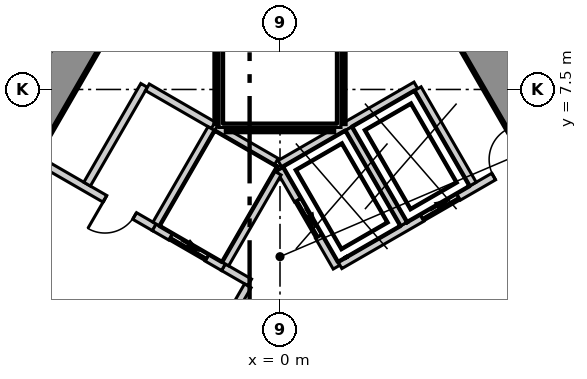
"""IFC4 building model, lengths in metres.
Left out: names, types, materials, properties, quantities, classifications, styles, units other than length and angle.
Written with IfcOpenShell. Run it as: python <this file> out.ifc"""

import sys

from ifc_helpers import new_model, si_unit, direction, frame, frame_2d, origin, place, context, subcontext, project, spatial, polyline, rectangle, outline, extrude, element, fill, save


model = new_model("IFC4")
c1 = context("Model", 3, precision=1e-05, world=origin(), true_north=direction((0.0, 1.0)))
c2 = subcontext(c1, "Body", "Model", "MODEL_VIEW")
j1 = project(units=[si_unit("LENGTHUNIT", "METRE"), si_unit("PLANEANGLEUNIT", "RADIAN")], contexts=[c1])
p1 = place(None, origin())
s1 = spatial("IfcSite", under=j1, at=p1, CompositionType="ELEMENT")
p2 = place(p1, origin())
s2 = spatial("IfcBuilding", under=s1, at=p2, CompositionType="ELEMENT")
p3 = place(p2, frame((0.0, 0.0, 95.3)))
s3 = spatial("IfcBuildingStorey", under=s2, at=p3, CompositionType="ELEMENT", Elevation=95.3)
p4 = place(p3, frame((-1.66, 15.025, -0.3), z_axis=(0.0, 0.0, 1.0), x_axis=(-0.500003780125, -0.866023221317, 0.0)))
e1 = element("IfcWall", 1, at=p4, inside=s3, PredefinedType="SHEAR", context=c2, shape_type="SweptSolid", body=[
    extrude(outline(polyline([(-0.462, -0.55), (1.483, -0.55), (3.428, -0.55), (5.374, -0.55), (7.319, -0.55), (9.264, -0.55), (11.209, -0.55), (13.155, -0.55), (15.1, -0.55), (17.045, -0.55), (18.99, -0.55), (20.936, -0.55), (22.881, -0.55), (24.826, -0.55), (23.902, 0.55), (21.949, 0.55), (19.995, 0.55), (18.042, 0.55), (16.089, 0.55), (14.135, 0.55), (12.182, 0.55), (10.229, 0.55), (8.275, 0.55), (6.322, 0.55), (4.369, 0.55), (2.415, 0.55), (0.462, 0.55), (-0.462, -0.55)])), origin(), (0.0, 0.0, 1.0), 4.2),
])
p5 = place(p4, frame((11.776, 0.0, 0.3)))
e2 = element("IfcOpeningElement", 2, at=p5, cuts=e1, PredefinedType="OPENING", context=c2, shape_type="SweptSolid", body=[
    extrude(rectangle(XDim=1.1, YDim=2.1, at=frame_2d((0.55, 1.05))), frame((0.0, 0.56, 0.0), z_axis=(0.0, -1.0, 0.0), x_axis=(1.0, 0.0, 0.0)), (0.0, 0.0, 1.0), 1.12),
])
p6 = place(p3, frame((13.842, -6.075, -0.3), z_axis=(0.0, 0.0, 1.0), x_axis=(-0.500003780125, 0.866023221317, 0.0)))
e3 = element("IfcWall", 3, at=p6, inside=s3, PredefinedType="SHEAR", context=c2, shape_type="SweptSolid", body=[
    extrude(outline(polyline([(-0.462, -0.55), (1.483, -0.55), (3.428, -0.55), (5.374, -0.55), (7.319, -0.55), (9.264, -0.55), (11.209, -0.55), (13.155, -0.55), (15.1, -0.55), (17.045, -0.55), (18.99, -0.55), (20.936, -0.55), (22.881, -0.55), (24.826, -0.55), (23.902, 0.55), (21.949, 0.55), (19.995, 0.55), (18.042, 0.55), (16.089, 0.55), (14.135, 0.55), (12.182, 0.55), (10.229, 0.55), (8.275, 0.55), (6.322, 0.55), (4.369, 0.55), (2.415, 0.55), (0.462, 0.55), (-0.462, -0.55)])), origin(), (0.0, 0.0, 1.0), 4.2),
])
p7 = place(p6, frame((11.426, 0.0, 0.3)))
e4 = element("IfcOpeningElement", 4, at=p7, cuts=e3, PredefinedType="OPENING", context=c2, shape_type="SweptSolid", body=[
    extrude(rectangle(XDim=1.8, YDim=2.1, at=frame_2d((0.9, 1.05))), frame((0.0, 0.56, 0.0), z_axis=(0.0, -1.0, 0.0), x_axis=(1.0, 0.0, 0.0)), (0.0, 0.0, 1.0), 1.12),
])
p8 = place(p3, frame((-3.234, 36.072, 0.0), z_axis=(0.0, 0.0, 1.0), x_axis=(-0.500009108245, -0.866020145073, 0.0)))
e5 = element("IfcWall", 5, at=p8, inside=s3, PredefinedType="ELEMENTEDWALL", context=c2, shape_type="SweptSolid", body=[
    extrude(rectangle(XDim=59.225, YDim=0.2, at=frame_2d((29.613, 0.0))), origin(), (0.0, 0.0, 1.0), 3.9),
])
p9 = place(p8, frame((2.042, 0.0, 0.9)))
e6 = element("IfcOpeningElement", 6, at=p9, cuts=e5, PredefinedType="OPENING", context=c2, shape_type="SweptSolid", body=[
    extrude(rectangle(XDim=5.6, YDim=2.5, at=frame_2d((2.8, 1.25))), frame((0.0, 0.11, 0.0), z_axis=(0.0, -1.0, 0.0), x_axis=(1.0, 0.0, 0.0)), (0.0, 0.0, 1.0), 0.22),
])
p10 = place(p8, frame((9.122, 0.0, 0.9)))
e7 = element("IfcOpeningElement", 7, at=p10, cuts=e5, PredefinedType="OPENING", context=c2, shape_type="SweptSolid", body=[
    extrude(rectangle(XDim=5.6, YDim=2.5, at=frame_2d((2.8, 1.25))), frame((0.0, 0.11, 0.0), z_axis=(0.0, -1.0, 0.0), x_axis=(1.0, 0.0, 0.0)), (0.0, 0.0, 1.0), 0.22),
])
p11 = place(p8, frame((16.202, 0.0, 0.9)))
e8 = element("IfcOpeningElement", 8, at=p11, cuts=e5, PredefinedType="OPENING", context=c2, shape_type="SweptSolid", body=[
    extrude(rectangle(XDim=5.6, YDim=2.5, at=frame_2d((2.8, 1.25))), frame((0.0, 0.11, 0.0), z_axis=(0.0, -1.0, 0.0), x_axis=(1.0, 0.0, 0.0)), (0.0, 0.0, 1.0), 0.22),
])
p12 = place(p8, frame((23.282, 0.0, 0.9)))
e9 = element("IfcOpeningElement", 9, at=p12, cuts=e5, PredefinedType="OPENING", context=c2, shape_type="SweptSolid", body=[
    extrude(rectangle(XDim=5.6, YDim=2.5, at=frame_2d((2.8, 1.25))), frame((0.0, 0.11, 0.0), z_axis=(0.0, -1.0, 0.0), x_axis=(1.0, 0.0, 0.0)), (0.0, 0.0, 1.0), 0.22),
])
p13 = place(p8, frame((30.362, 0.0, 0.9)))
e10 = element("IfcOpeningElement", 10, at=p13, cuts=e5, PredefinedType="OPENING", context=c2, shape_type="SweptSolid", body=[
    extrude(rectangle(XDim=5.6, YDim=2.5, at=frame_2d((2.8, 1.25))), frame((0.0, 0.11, 0.0), z_axis=(0.0, -1.0, 0.0), x_axis=(1.0, 0.0, 0.0)), (0.0, 0.0, 1.0), 0.22),
])
p14 = place(p8, frame((37.442, 0.0, 0.9)))
e11 = element("IfcOpeningElement", 11, at=p14, cuts=e5, PredefinedType="OPENING", context=c2, shape_type="SweptSolid", body=[
    extrude(rectangle(XDim=5.6, YDim=2.5, at=frame_2d((2.8, 1.25))), frame((0.0, 0.11, 0.0), z_axis=(0.0, -1.0, 0.0), x_axis=(1.0, 0.0, 0.0)), (0.0, 0.0, 1.0), 0.22),
])
p15 = place(p8, frame((44.522, 0.0, 0.9)))
e12 = element("IfcOpeningElement", 12, at=p15, cuts=e5, PredefinedType="OPENING", context=c2, shape_type="SweptSolid", body=[
    extrude(rectangle(XDim=5.6, YDim=2.5, at=frame_2d((2.8, 1.25))), frame((0.0, 0.11, 0.0), z_axis=(0.0, -1.0, 0.0), x_axis=(1.0, 0.0, 0.0)), (0.0, 0.0, 1.0), 0.22),
])
p16 = place(p8, frame((51.602, 0.0, 0.9)))
e13 = element("IfcOpeningElement", 13, at=p16, cuts=e5, PredefinedType="OPENING", context=c2, shape_type="SweptSolid", body=[
    extrude(rectangle(XDim=5.6, YDim=2.5, at=frame_2d((2.8, 1.25))), frame((0.0, 0.11, 0.0), z_axis=(0.0, -1.0, 0.0), x_axis=(1.0, 0.0, 0.0)), (0.0, 0.0, 1.0), 0.22),
])
p17 = place(p3, frame((32.857, -15.235, 0.0), z_axis=(0.0, 0.0, 1.0), x_axis=(-0.500009108245, 0.866020145073, 0.0)))
e14 = element("IfcWall", 14, at=p17, inside=s3, PredefinedType="ELEMENTEDWALL", context=c2, shape_type="SweptSolid", body=[
    extrude(rectangle(XDim=59.225, YDim=0.2, at=frame_2d((29.613, 0.0))), origin(), (0.0, 0.0, 1.0), 3.9),
])
p18 = place(p17, frame((2.043, 0.0, 0.9)))
e15 = element("IfcOpeningElement", 15, at=p18, cuts=e14, PredefinedType="OPENING", context=c2, shape_type="SweptSolid", body=[
    extrude(rectangle(XDim=5.6, YDim=2.5, at=frame_2d((2.8, 1.25))), frame((0.0, 0.11, 0.0), z_axis=(0.0, -1.0, 0.0), x_axis=(1.0, 0.0, 0.0)), (0.0, 0.0, 1.0), 0.22),
])
p19 = place(p17, frame((9.123, 0.0, 0.9)))
e16 = element("IfcOpeningElement", 16, at=p19, cuts=e14, PredefinedType="OPENING", context=c2, shape_type="SweptSolid", body=[
    extrude(rectangle(XDim=5.6, YDim=2.5, at=frame_2d((2.8, 1.25))), frame((0.0, 0.11, 0.0), z_axis=(0.0, -1.0, 0.0), x_axis=(1.0, 0.0, 0.0)), (0.0, 0.0, 1.0), 0.22),
])
p20 = place(p17, frame((16.203, 0.0, 0.9)))
e17 = element("IfcOpeningElement", 17, at=p20, cuts=e14, PredefinedType="OPENING", context=c2, shape_type="SweptSolid", body=[
    extrude(rectangle(XDim=5.6, YDim=2.5, at=frame_2d((2.8, 1.25))), frame((0.0, 0.11, 0.0), z_axis=(0.0, -1.0, 0.0), x_axis=(1.0, 0.0, 0.0)), (0.0, 0.0, 1.0), 0.22),
])
p21 = place(p17, frame((23.282, 0.0, 0.9)))
e18 = element("IfcOpeningElement", 18, at=p21, cuts=e14, PredefinedType="OPENING", context=c2, shape_type="SweptSolid", body=[
    extrude(rectangle(XDim=5.6, YDim=2.5, at=frame_2d((2.8, 1.25))), frame((0.0, 0.11, 0.0), z_axis=(0.0, -1.0, 0.0), x_axis=(1.0, 0.0, 0.0)), (0.0, 0.0, 1.0), 0.22),
])
p22 = place(p17, frame((30.362, 0.0, 0.9)))
e19 = element("IfcOpeningElement", 19, at=p22, cuts=e14, PredefinedType="OPENING", context=c2, shape_type="SweptSolid", body=[
    extrude(rectangle(XDim=5.6, YDim=2.5, at=frame_2d((2.8, 1.25))), frame((0.0, 0.11, 0.0), z_axis=(0.0, -1.0, 0.0), x_axis=(1.0, 0.0, 0.0)), (0.0, 0.0, 1.0), 0.22),
])
p23 = place(p17, frame((37.442, 0.0, 0.9)))
e20 = element("IfcOpeningElement", 20, at=p23, cuts=e14, PredefinedType="OPENING", context=c2, shape_type="SweptSolid", body=[
    extrude(rectangle(XDim=5.6, YDim=2.5, at=frame_2d((2.8, 1.25))), frame((0.0, 0.11, 0.0), z_axis=(0.0, -1.0, 0.0), x_axis=(1.0, 0.0, 0.0)), (0.0, 0.0, 1.0), 0.22),
])
p24 = place(p17, frame((44.522, 0.0, 0.9)))
e21 = element("IfcOpeningElement", 21, at=p24, cuts=e14, PredefinedType="OPENING", context=c2, shape_type="SweptSolid", body=[
    extrude(rectangle(XDim=5.6, YDim=2.5, at=frame_2d((2.8, 1.25))), frame((0.0, 0.11, 0.0), z_axis=(0.0, -1.0, 0.0), x_axis=(1.0, 0.0, 0.0)), (0.0, 0.0, 1.0), 0.22),
])
p25 = place(p17, frame((51.602, 0.0, 0.9)))
e22 = element("IfcOpeningElement", 22, at=p25, cuts=e14, PredefinedType="OPENING", context=c2, shape_type="SweptSolid", body=[
    extrude(rectangle(XDim=5.6, YDim=2.5, at=frame_2d((2.8, 1.25))), frame((0.0, 0.11, 0.0), z_axis=(0.0, -1.0, 0.0), x_axis=(1.0, 0.0, 0.0)), (0.0, 0.0, 1.0), 0.22),
])
p26 = place(p3, frame((-16.685, -6.2, 0.0), z_axis=(0.0, 0.0, 1.0), x_axis=(0.500002442456, 0.866023993627, 0.0)))
e23 = element("IfcWall", 23, at=p26, inside=s3, PredefinedType="PARTITIONING", context=c2, shape_type="SweptSolid", body=[
    extrude(rectangle(XDim=27.424, YDim=0.15, at=frame_2d((13.712, 0.0))), origin(), (0.0, 0.0, 1.0), 3.9),
])
p27 = place(p26, frame((23.508, 0.0, 0.0)))
e24 = element("IfcOpeningElement", 24, at=p27, cuts=e23, PredefinedType="OPENING", context=c2, shape_type="SweptSolid", body=[
    extrude(rectangle(XDim=1.2, YDim=2.1, at=frame_2d((0.6, 1.05))), frame((0.0, 0.085, 0.0), z_axis=(0.0, -1.0, 0.0), x_axis=(1.0, 0.0, 0.0)), (0.0, 0.0, 1.0), 0.17),
])
p28 = place(p26, frame((13.112, 0.0, 0.0)))
e25 = element("IfcOpeningElement", 25, at=p28, cuts=e23, PredefinedType="OPENING", context=c2, shape_type="SweptSolid", body=[
    extrude(rectangle(XDim=1.2, YDim=2.1, at=frame_2d((0.6, 1.05))), frame((0.0, 0.085, 0.0), z_axis=(0.0, -1.0, 0.0), x_axis=(1.0, 0.0, 0.0)), (0.0, 0.0, 1.0), 0.17),
])
p29 = place(p26, frame((2.716, 0.0, 0.0)))
e26 = element("IfcOpeningElement", 26, at=p29, cuts=e23, PredefinedType="OPENING", context=c2, shape_type="SweptSolid", body=[
    extrude(rectangle(XDim=1.2, YDim=2.1, at=frame_2d((0.6, 1.05))), frame((0.0, 0.085, 0.0), z_axis=(0.0, -1.0, 0.0), x_axis=(1.0, 0.0, 0.0)), (0.0, 0.0, 1.0), 0.17),
])
p30 = place(p3, frame((3.017, 17.475, 0.0), z_axis=(0.0, 0.0, 1.0), x_axis=(0.499977309191, -0.866038503933, 0.0)))
e27 = element("IfcWall", 27, at=p30, inside=s3, PredefinedType="PARTITIONING", context=c2, shape_type="SweptSolid", body=[
    extrude(rectangle(XDim=27.337, YDim=0.15, at=frame_2d((13.668, 0.0))), origin(), (0.0, 0.0, 1.0), 3.9),
])
p31 = place(p30, frame((23.421, 0.0, 0.0)))
e28 = element("IfcOpeningElement", 28, at=p31, cuts=e27, PredefinedType="OPENING", context=c2, shape_type="SweptSolid", body=[
    extrude(rectangle(XDim=1.2, YDim=2.1, at=frame_2d((0.6, 1.05))), frame((0.0, 0.085, 0.0), z_axis=(0.0, -1.0, 0.0), x_axis=(1.0, 0.0, 0.0)), (0.0, 0.0, 1.0), 0.17),
])
p32 = place(p30, frame((13.025, 0.0, 0.0)))
e29 = element("IfcOpeningElement", 29, at=p32, cuts=e27, PredefinedType="OPENING", context=c2, shape_type="SweptSolid", body=[
    extrude(rectangle(XDim=1.2, YDim=2.1, at=frame_2d((0.6, 1.05))), frame((0.0, 0.085, 0.0), z_axis=(0.0, -1.0, 0.0), x_axis=(1.0, 0.0, 0.0)), (0.0, 0.0, 1.0), 0.17),
])
p33 = place(p30, frame((2.629, 0.0, 0.0)))
e30 = element("IfcOpeningElement", 30, at=p33, cuts=e27, PredefinedType="OPENING", context=c2, shape_type="SweptSolid", body=[
    extrude(rectangle(XDim=1.2, YDim=2.1, at=frame_2d((0.6, 1.05))), frame((0.0, 0.085, 0.0), z_axis=(0.0, -1.0, 0.0), x_axis=(1.0, 0.0, 0.0)), (0.0, 0.0, 1.0), 0.17),
])
p34 = place(p3, frame((-0.002, 5.541, 0.0), z_axis=(0.0, 0.0, 1.0), x_axis=(0.86600155993, 0.500041296494, 0.0)))
e31 = element("IfcWall", 31, at=p34, inside=s3, PredefinedType="SOLIDWALL", context=c2, shape_type="SweptSolid", body=[
    extrude(rectangle(XDim=4.132, YDim=0.2, at=frame_2d((2.066, 0.0))), origin(), (0.0, 0.0, 1.0), 3.9),
])
p35 = place(p3, frame((0.0, 5.4, 0.0), z_axis=(0.0, 0.0, 1.0), x_axis=(0.500103862429, -0.865965430478, 0.0)))
e32 = element("IfcWall", 32, at=p35, inside=s3, PredefinedType="SOLIDWALL", context=c2, shape_type="SweptSolid", body=[
    extrude(rectangle(XDim=2.973, YDim=0.2, at=frame_2d((1.487, 0.0))), origin(), (0.0, 0.0, 1.0), 3.9),
])
p36 = place(p35, frame((0.937, 0.0, 0.0)))
e33 = element("IfcOpeningElement", 33, at=p36, cuts=e32, PredefinedType="OPENING", context=c2, shape_type="SweptSolid", body=[
    extrude(rectangle(XDim=1.1, YDim=2.1, at=frame_2d((0.55, 1.05))), frame((0.0, 0.11, 0.0), z_axis=(0.0, -1.0, 0.0), x_axis=(1.0, 0.0, 0.0)), (0.0, 0.0, 1.0), 0.22),
])
p37 = place(p3, frame((1.578, 2.874, 0.0), z_axis=(0.0, 0.0, 1.0), x_axis=(0.866062167127, 0.499936318615, 0.0)))
e34 = element("IfcWall", 34, at=p37, inside=s3, PredefinedType="SOLIDWALL", context=c2, shape_type="SweptSolid", body=[
    extrude(rectangle(XDim=6.127, YDim=0.2, at=frame_2d((3.063, 0.0))), origin(), (0.0, 0.0, 1.0), 3.9),
])
p38 = place(p37, frame((2.496, 0.0, 0.0)))
e35 = element("IfcOpeningElement", 35, at=p38, cuts=e34, PredefinedType="OPENING", context=c2, shape_type="SweptSolid", body=[
    extrude(rectangle(XDim=1.1, YDim=2.1, at=frame_2d((0.55, 1.05))), frame((0.0, 0.11, 0.0), z_axis=(0.0, -1.0, 0.0), x_axis=(1.0, 0.0, 0.0)), (0.0, 0.0, 1.0), 0.22),
])
p39 = place(p37, frame((4.671, 0.0, 0.0)))
e36 = element("IfcOpeningElement", 36, at=p39, cuts=e34, PredefinedType="OPENING", context=c2, shape_type="SweptSolid", body=[
    extrude(rectangle(XDim=0.9, YDim=2.1, at=frame_2d((0.45, 1.05))), frame((0.0, 0.11, 0.0), z_axis=(0.0, -1.0, 0.0), x_axis=(1.0, 0.0, 0.0)), (0.0, 0.0, 1.0), 0.22),
])
p40 = place(p3, frame((3.278, -0.071, 0.0), z_axis=(0.0, 0.0, 1.0), x_axis=(0.865983187006, 0.500073114477, 0.0)))
e37 = element("IfcWall", 37, at=p40, inside=s3, PredefinedType="SOLIDWALL", context=c2, shape_type="SweptSolid", body=[
    extrude(rectangle(XDim=6.127, YDim=0.2, at=frame_2d((3.063, 0.0))), origin(), (0.0, 0.0, 1.0), 3.9),
])
for number, where, z_axis, x_axis in (
    (38, (3.626, 7.52, 0.0), (0.0, 0.0, 1.0), (0.5, -0.866, 0.0)),
    (39, (1.807, 6.47, 0.0), (0.0, 0.0, 1.0), (0.5, -0.866, 0.0)),
):
    element("IfcWall", number, at=place(p3, frame(where, z_axis=z_axis, x_axis=x_axis)), inside=s3, PredefinedType="SOLIDWALL", context=c2, shape_type="SweptSolid", body=[
        extrude(rectangle(XDim=2.9, YDim=0.2, at=frame_2d((1.45, 0.0))), origin(), (0.0, 0.0, 1.0), 3.9),
    ])
p41 = place(p3, frame((-8.584, 2.993, 0.0), z_axis=(0.0, 0.0, 1.0), x_axis=(0.866075409494, -0.499913377567, 0.0)))
e40 = element("IfcWall", 40, at=p41, inside=s3, PredefinedType="SOLIDWALL", context=c2, shape_type="SweptSolid", body=[
    extrude(rectangle(XDim=4.133, YDim=0.2, at=frame_2d((2.066, 0.0))), origin(), (0.0, 0.0, 1.0), 3.9),
])
p42 = place(p41, frame((2.53, 0.0, 0.0)))
e41 = element("IfcOpeningElement", 41, at=p42, cuts=e40, PredefinedType="OPENING", context=c2, shape_type="SweptSolid", body=[
    extrude(rectangle(XDim=1.1, YDim=2.1, at=frame_2d((0.55, 1.05))), frame((0.0, 0.11, 0.0), z_axis=(0.0, -1.0, 0.0), x_axis=(1.0, 0.0, 0.0)), (0.0, 0.0, 1.0), 0.22),
])
p43 = place(p3, frame((-6.884, 5.937, 0.0), z_axis=(0.0, 0.0, 1.0), x_axis=(0.866075409494, -0.499913377567, 0.0)))
e42 = element("IfcWall", 42, at=p43, inside=s3, PredefinedType="SOLIDWALL", context=c2, shape_type="SweptSolid", body=[
    extrude(rectangle(XDim=4.133, YDim=0.2, at=frame_2d((2.066, 0.0))), origin(), (0.0, 0.0, 1.0), 3.9),
])
p44 = place(p43, frame((2.63, 0.0, 0.0)))
e43 = element("IfcOpeningElement", 43, at=p44, cuts=e42, PredefinedType="OPENING", context=c2, shape_type="SweptSolid", body=[
    extrude(rectangle(XDim=0.9, YDim=2.1, at=frame_2d((0.45, 1.05))), frame((0.0, 0.11, 0.0), z_axis=(0.0, -1.0, 0.0), x_axis=(1.0, 0.0, 0.0)), (0.0, 0.0, 1.0), 0.22),
])
p45 = place(p3, frame((-1.488, 2.822, 0.0), z_axis=(0.0, 0.0, 1.0), x_axis=(0.866236612152, -0.499633997809, 0.0)))
e44 = element("IfcWall", 44, at=p45, inside=s3, PredefinedType="SOLIDWALL", context=c2, shape_type="SweptSolid", body=[
    extrude(rectangle(XDim=0.796, YDim=0.2, at=frame_2d((0.398, 0.0))), origin(), (0.0, 0.0, 1.0), 3.9),
])
p46 = place(p3, frame((-5.076, 5.009, 0.0), z_axis=(0.0, 0.0, 1.0), x_axis=(0.50002537861, 0.866010750942, 0.0)))
e45 = element("IfcWall", 45, at=p46, inside=s3, PredefinedType="SOLIDWALL", context=c2, shape_type="SweptSolid", body=[
    extrude(rectangle(XDim=3.0, YDim=0.2, at=frame_2d((1.5, 0.0))), origin(), (0.0, 0.0, 1.0), 3.9),
])
p47 = place(p3, frame((-3.489, 7.557, 0.0), z_axis=(0.0, 0.0, 1.0), x_axis=(0.866010750942, -0.50002537861, 0.0)))
e46 = element("IfcWall", 46, at=p47, inside=s3, PredefinedType="SOLIDWALL", context=c2, shape_type="SweptSolid", body=[
    extrude(rectangle(XDim=2.0, YDim=0.2, at=frame_2d((1.0, 0.0))), origin(), (0.0, 0.0, 1.0), 3.9),
])
p48 = place(p3, frame((-2.444, -0.433, 0.0), z_axis=(0.0, 0.0, 1.0), x_axis=(0.500035624827, 0.866004834804, 0.0)))
e47 = element("IfcWall", 47, at=p48, inside=s3, PredefinedType="SOLIDWALL", context=c2, shape_type="SweptSolid", body=[
    extrude(rectangle(XDim=3.194, YDim=0.2, at=frame_2d((1.597, 0.0))), origin(), (0.0, 0.0, 1.0), 3.9),
])
p49 = place(p3, frame((-3.309, 3.873, 0.0), z_axis=(0.0, 0.0, 1.0), x_axis=(0.866098583652, -0.499873227325, 0.0)))
e48 = element("IfcWall", 48, at=p49, inside=s3, PredefinedType="SOLIDWALL", context=c2, shape_type="SweptSolid", body=[
    extrude(rectangle(XDim=2.103, YDim=0.2, at=frame_2d((1.051, 0.0))), origin(), (0.0, 0.0, 1.0), 3.9),
])
p50 = place(p49, frame((0.502, 0.0, 0.0)))
e49 = element("IfcOpeningElement", 49, at=p50, cuts=e48, PredefinedType="OPENING", context=c2, shape_type="SweptSolid", body=[
    extrude(rectangle(XDim=1.1, YDim=2.1, at=frame_2d((0.55, 1.05))), frame((0.0, 0.11, 0.0), z_axis=(0.0, -1.0, 0.0), x_axis=(1.0, 0.0, 0.0)), (0.0, 0.0, 1.0), 0.22),
])
p51 = place(p3, frame((-3.257, 3.959, 0.0), z_axis=(0.0, 0.0, 1.0), x_axis=(0.50012328804, 0.865954211699, 0.0)))
e50 = element("IfcWall", 50, at=p51, inside=s3, PredefinedType="SOLIDWALL", context=c2, shape_type="SweptSolid", body=[
    extrude(rectangle(XDim=2.9, YDim=0.2, at=frame_2d((1.45, 0.0))), origin(), (0.0, 0.0, 1.0), 3.9),
])
p52 = place(p3, frame((-1.67, 6.507, 0.0), z_axis=(0.0, 0.0, 1.0), x_axis=(0.865941441609, -0.500145398563, 0.0)))
e51 = element("IfcWall", 51, at=p52, inside=s3, PredefinedType="SOLIDWALL", context=c2, shape_type="SweptSolid", body=[
    extrude(rectangle(XDim=1.815, YDim=0.2, at=frame_2d((0.908, 0.0))), origin(), (0.0, 0.0, 1.0), 3.9),
])
p53 = place(p3, frame((-1.438, 2.909, 0.0), z_axis=(0.0, 0.0, 1.0), x_axis=(0.499829630636, 0.866123744241, 0.0)))
e52 = element("IfcWall", 52, at=p53, inside=s3, PredefinedType="SOLIDWALL", context=c2, shape_type="SweptSolid", body=[
    extrude(rectangle(XDim=2.761, YDim=0.2, at=frame_2d((1.38, 0.0))), origin(), (0.0, 0.0, 1.0), 3.9),
])
p54 = place(p3, frame((1.6, 6.615, 0.0), z_axis=(0.0, 0.0, 1.0), x_axis=(0.0, 1.0, 0.0)))
e53 = element("IfcWall", 53, at=p54, inside=s3, PredefinedType="SOLIDWALL", context=c2, shape_type="SweptSolid", body=[
    extrude(rectangle(XDim=8.474, YDim=0.2, at=frame_2d((4.237, 0.0))), origin(), (0.0, 0.0, 1.0), 3.9),
])
p55 = place(p3, frame((-1.4, 6.5, 0.0), z_axis=(0.0, 0.0, 1.0), x_axis=(1.0, 0.0, 0.0)))
e54 = element("IfcWall", 54, at=p55, inside=s3, PredefinedType="SOLIDWALL", context=c2, shape_type="SweptSolid", body=[
    extrude(rectangle(XDim=2.8, YDim=0.2, at=frame_2d((1.4, 0.0))), origin(), (0.0, 0.0, 1.0), 3.9),
])
p56 = place(p3, frame((-1.6, 6.615, 0.0), z_axis=(0.0, 0.0, 1.0), x_axis=(0.0, 1.0, 0.0)))
e55 = element("IfcWall", 55, at=p56, inside=s3, PredefinedType="SOLIDWALL", context=c2, shape_type="SweptSolid", body=[
    extrude(rectangle(XDim=8.474, YDim=0.2, at=frame_2d((4.237, 0.0))), origin(), (0.0, 0.0, 1.0), 3.9),
])
p57 = place(p36, origin())
e56 = element("IfcDoor", 56, at=p57, inside=s3, OperationType="SLIDING_TO_LEFT", PredefinedType="DOOR", context=c2, shape_type="SweptSolid", body=[
    extrude(rectangle(XDim=1.1, YDim=2.1, at=frame_2d((0.55, 1.05))), frame((0.0, 0.025, 0.0), z_axis=(0.0, -1.0, 0.0), x_axis=(1.0, 0.0, 0.0)), (0.0, 0.0, 1.0), 0.05),
])
fill(e33, e56)
p58 = place(p38, origin())
e57 = element("IfcDoor", 57, at=p58, inside=s3, OperationType="SLIDING_TO_LEFT", PredefinedType="DOOR", context=c2, shape_type="SweptSolid", body=[
    extrude(rectangle(XDim=1.1, YDim=2.1, at=frame_2d((0.55, 1.05))), frame((0.0, 0.025, 0.0), z_axis=(0.0, -1.0, 0.0), x_axis=(1.0, 0.0, 0.0)), (0.0, 0.0, 1.0), 0.05),
])
fill(e35, e57)
p59 = place(p50, origin())
e58 = element("IfcDoor", 58, at=p59, inside=s3, OperationType="SLIDING_TO_LEFT", PredefinedType="DOOR", context=c2, shape_type="SweptSolid", body=[
    extrude(rectangle(XDim=1.1, YDim=2.1, at=frame_2d((0.55, 1.05))), frame((0.0, 0.025, 0.0), z_axis=(0.0, -1.0, 0.0), x_axis=(1.0, 0.0, 0.0)), (0.0, 0.0, 1.0), 0.05),
])
fill(e49, e58)
p60 = place(p44, origin())
e59 = element("IfcDoor", 59, at=p60, inside=s3, OperationType="SINGLE_SWING_LEFT", PredefinedType="DOOR", context=c2, shape_type="SweptSolid", body=[
    extrude(rectangle(XDim=0.9, YDim=2.1, at=frame_2d((0.45, 1.05))), frame((0.0, 0.025, 0.0), z_axis=(0.0, -1.0, 0.0), x_axis=(1.0, 0.0, 0.0)), (0.0, 0.0, 1.0), 0.05),
])
fill(e43, e59)
p61 = place(p39, origin())
e60 = element("IfcDoor", 60, at=p61, inside=s3, OperationType="SINGLE_SWING_LEFT", PredefinedType="DOOR", context=c2, shape_type="SweptSolid", body=[
    extrude(rectangle(XDim=0.9, YDim=2.1, at=frame_2d((0.45, 1.05))), frame((0.0, 0.025, 0.0), z_axis=(0.0, -1.0, 0.0), x_axis=(1.0, 0.0, 0.0)), (0.0, 0.0, 1.0), 0.05),
])
fill(e36, e60)
save(model, sys.argv[1])
